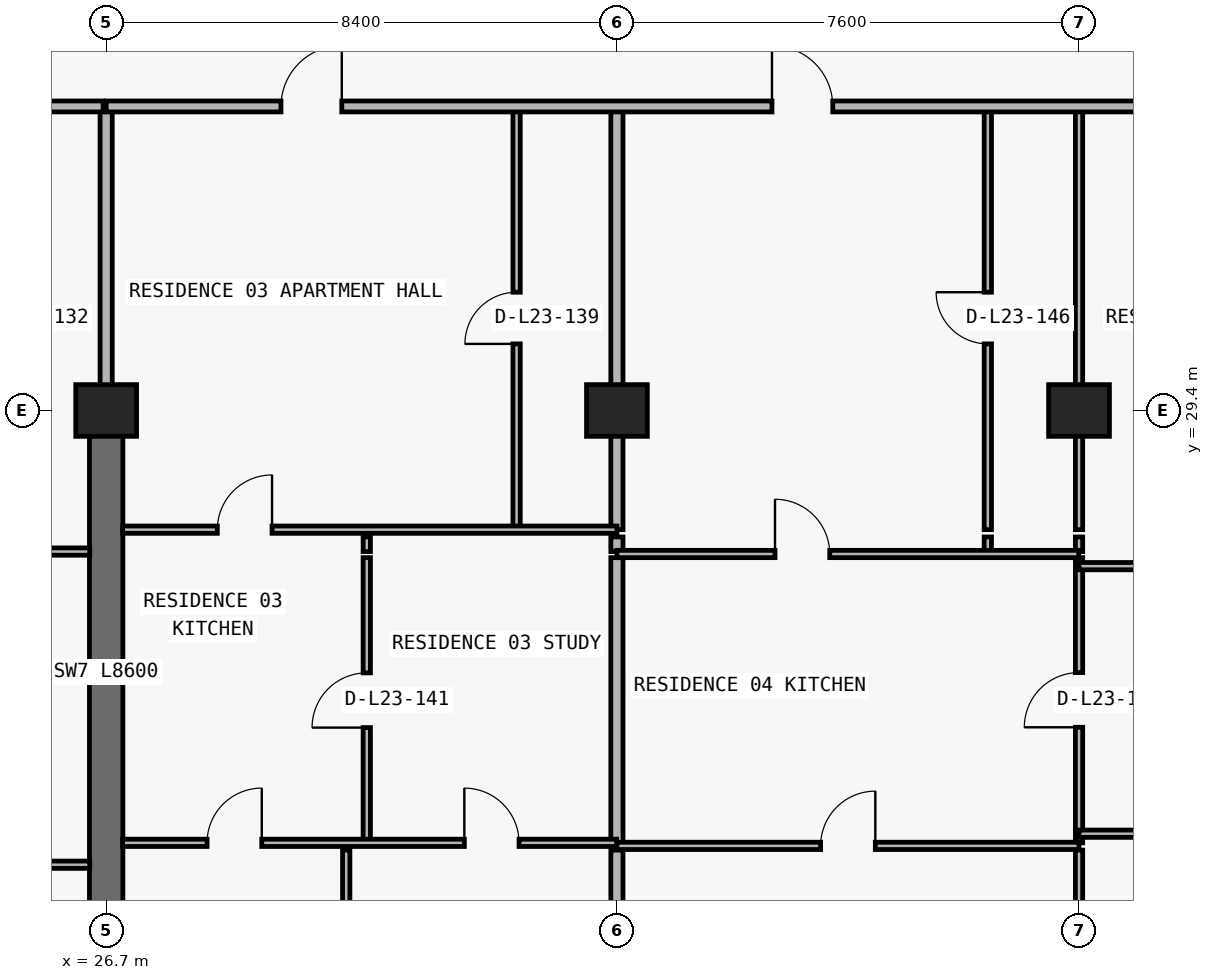
"""IFC4 building model, lengths in metres.
Left out: names, types, materials, properties, quantities, classifications, styles, units other than length and angle.
Written with IfcOpenShell. Run it as: python <this file> out.ifc"""

import sys

from ifc_helpers import new_model, si_unit, direction, frame, frame_2d, origin, origin_2d, place, context, subcontext, project, spatial, rectangle, extrude, element, fill, save


model = new_model("IFC4")
c1 = context("Model", 3, precision=1e-05, world=origin(), true_north=direction((0.0, 1.0)))
c2 = subcontext(c1, "Body", "Model", "MODEL_VIEW")
j1 = project(units=[si_unit("LENGTHUNIT", "METRE"), si_unit("PLANEANGLEUNIT", "RADIAN")], contexts=[c1])
p1 = place(None, origin())
s1 = spatial("IfcSite", under=j1, at=p1, CompositionType="ELEMENT")
p2 = place(p1, origin())
s2 = spatial("IfcBuilding", under=s1, at=p2, CompositionType="ELEMENT")
p3 = place(p2, frame((0.0, 0.0, 87.9)))
s3 = spatial("IfcBuildingStorey", under=s2, at=p3, CompositionType="ELEMENT", Elevation=87.9)
for number, where, z_axis, x_axis in (
    (1, (26.7, 29.4, 0.0), (0.0, 0.0, 1.0), (1.0, 0.0, 0.0)),
    (2, (35.1, 29.4, 0.0), (0.0, 0.0, 1.0), (1.0, 0.0, 0.0)),
    (3, (42.7, 29.4, 0.0), (0.0, 0.0, 1.0), (1.0, 0.0, 0.0)),
):
    element("IfcColumn", number, at=place(p3, frame(where, z_axis=z_axis, x_axis=x_axis)), inside=s3, PredefinedType="COLUMN", context=c2, shape_type="SweptSolid", body=[
        extrude(rectangle(XDim=1.0, YDim=0.85, at=origin_2d()), origin(), (0.0, 0.0, 1.0), 3.05),
    ])
p4 = place(p3, frame((26.7, 20.8, 0.0), z_axis=(0.0, 0.0, 1.0), x_axis=(0.0, 1.0, 0.0)))
e4 = element("IfcWall", 4, at=p4, inside=s3, PredefinedType="SHEAR", context=c2, shape_type="SweptSolid", body=[
    extrude(rectangle(XDim=8.6, YDim=0.55, at=frame_2d((4.3, 0.0))), origin(), (0.0, 0.0, 1.0), 3.05),
])
p5 = place(p3, frame((26.7, 29.405, 0.0), z_axis=(0.0, 0.0, 1.0), x_axis=(0.0, 1.0, 0.0)))
e5 = element("IfcWall", 5, at=p5, inside=s3, PredefinedType="PARTITIONING", context=c2, shape_type="SweptSolid", body=[
    extrude(rectangle(XDim=4.995, YDim=0.2, at=frame_2d((2.498, 0.0))), origin(), (0.0, 0.0, 1.0), 2.335),
])
p6 = place(p3, frame((30.648, 8.84, 0.0), z_axis=(0.0, 0.0, 1.0), x_axis=(0.0, 1.0, 0.0)))
e6 = element("IfcWall", 6, at=p6, inside=s3, PredefinedType="PARTITIONING", context=c2, shape_type="SweptSolid", body=[
    extrude(rectangle(XDim=13.33, YDim=0.12, at=frame_2d((6.665, 0.0))), origin(), (0.0, 0.0, 1.0), 3.05),
])
p7 = place(p3, frame((30.986, 22.29, 0.0), z_axis=(0.0, 0.0, 1.0), x_axis=(0.0, 1.0, 0.0)))
e7 = element("IfcWall", 7, at=p7, inside=s3, PredefinedType="PARTITIONING", context=c2, shape_type="SweptSolid", body=[
    extrude(rectangle(XDim=4.69, YDim=0.12, at=frame_2d((2.345, 0.0))), origin(), (0.0, 0.0, 1.0), 3.05),
])
p8 = place(p7, frame((1.895, 0.0, 0.0)))
e8 = element("IfcOpeningElement", 8, at=p8, cuts=e7, PredefinedType="OPENING", context=c2, shape_type="SweptSolid", body=[
    extrude(rectangle(XDim=0.9, YDim=2.15, at=frame_2d((0.45, 1.075))), frame((0.0, 0.07, 0.0), z_axis=(0.0, -1.0, 0.0), x_axis=(1.0, 0.0, 0.0)), (0.0, 0.0, 1.0), 0.14),
])
p9 = place(p3, frame((30.986, 27.08, 0.0), z_axis=(0.0, 0.0, 1.0), x_axis=(0.0, 1.0, 0.0)))
e9 = element("IfcWall", 9, at=p9, inside=s3, PredefinedType="PARTITIONING", context=c2, shape_type="SweptSolid", body=[
    extrude(rectangle(XDim=0.24, YDim=0.12, at=frame_2d((0.12, 0.0))), origin(), (0.0, 0.0, 1.0), 3.05),
])
p10 = place(p3, frame((33.45, 27.44, 0.0), z_axis=(0.0, 0.0, 1.0), x_axis=(0.0, 1.0, 0.0)))
e10 = element("IfcWall", 10, at=p10, inside=s3, PredefinedType="PARTITIONING", context=c2, shape_type="SweptSolid", body=[
    extrude(rectangle(XDim=6.96, YDim=0.12, at=frame_2d((3.48, 0.0))), origin(), (0.0, 0.0, 1.0), 3.05),
])
p11 = place(p10, frame((3.055, 0.0, 0.0)))
e11 = element("IfcOpeningElement", 11, at=p11, cuts=e10, PredefinedType="OPENING", context=c2, shape_type="SweptSolid", body=[
    extrude(rectangle(XDim=0.85, YDim=2.1, at=frame_2d((0.425, 1.05))), frame((0.0, 0.07, 0.0), z_axis=(0.0, -1.0, 0.0), x_axis=(1.0, 0.0, 0.0)), (0.0, 0.0, 1.0), 0.14),
])
p12 = place(p3, frame((35.1, 8.84, 0.0), z_axis=(0.0, 0.0, 1.0), x_axis=(0.0, 1.0, 0.0)))
e12 = element("IfcWall", 12, at=p12, inside=s3, PredefinedType="PARTITIONING", context=c2, shape_type="SweptSolid", body=[
    extrude(rectangle(XDim=13.33, YDim=0.2, at=frame_2d((6.665, 0.0))), origin(), (0.0, 0.0, 1.0), 2.174),
])
p13 = place(p3, frame((35.1, 22.29, 0.0), z_axis=(0.0, 0.0, 1.0), x_axis=(0.0, 1.0, 0.0)))
e13 = element("IfcWall", 13, at=p13, inside=s3, PredefinedType="PARTITIONING", context=c2, shape_type="SweptSolid", body=[
    extrude(rectangle(XDim=4.69, YDim=0.2, at=frame_2d((2.345, 0.0))), origin(), (0.0, 0.0, 1.0), 2.174),
])
p14 = place(p3, frame((35.1, 27.08, 0.0), z_axis=(0.0, 0.0, 1.0), x_axis=(0.0, 1.0, 0.0)))
e14 = element("IfcWall", 14, at=p14, inside=s3, PredefinedType="PARTITIONING", context=c2, shape_type="SweptSolid", body=[
    extrude(rectangle(XDim=0.24, YDim=0.2, at=frame_2d((0.12, 0.0))), origin(), (0.0, 0.0, 1.0), 2.174),
])
p15 = place(p3, frame((35.1, 27.44, 0.0), z_axis=(0.0, 0.0, 1.0), x_axis=(0.0, 1.0, 0.0)))
e15 = element("IfcWall", 15, at=p15, inside=s3, PredefinedType="PARTITIONING", context=c2, shape_type="SweptSolid", body=[
    extrude(rectangle(XDim=6.96, YDim=0.2, at=frame_2d((3.48, 0.0))), origin(), (0.0, 0.0, 1.0), 2.174),
])
p16 = place(p3, frame((41.2, 27.08, 0.0), z_axis=(0.0, 0.0, 1.0), x_axis=(0.0, 1.0, 0.0)))
e16 = element("IfcWall", 16, at=p16, inside=s3, PredefinedType="PARTITIONING", context=c2, shape_type="SweptSolid", body=[
    extrude(rectangle(XDim=0.24, YDim=0.12, at=frame_2d((0.12, 0.0))), origin(), (0.0, 0.0, 1.0), 3.05),
])
p17 = place(p3, frame((41.2, 27.44, 0.0), z_axis=(0.0, 0.0, 1.0), x_axis=(0.0, 1.0, 0.0)))
e17 = element("IfcWall", 17, at=p17, inside=s3, PredefinedType="PARTITIONING", context=c2, shape_type="SweptSolid", body=[
    extrude(rectangle(XDim=6.96, YDim=0.12, at=frame_2d((3.48, 0.0))), origin(), (0.0, 0.0, 1.0), 3.05),
])
p18 = place(p17, frame((3.055, 0.0, 0.0)))
e18 = element("IfcOpeningElement", 18, at=p18, cuts=e17, PredefinedType="OPENING", context=c2, shape_type="SweptSolid", body=[
    extrude(rectangle(XDim=0.85, YDim=2.1, at=frame_2d((0.425, 1.05))), frame((0.0, 0.07, 0.0), z_axis=(0.0, -1.0, 0.0), x_axis=(1.0, 0.0, 0.0)), (0.0, 0.0, 1.0), 0.14),
])
p19 = place(p3, frame((42.7, 8.84, 0.0), z_axis=(0.0, 0.0, 1.0), x_axis=(0.0, 1.0, 0.0)))
e19 = element("IfcWall", 19, at=p19, inside=s3, PredefinedType="PARTITIONING", context=c2, shape_type="SweptSolid", body=[
    extrude(rectangle(XDim=13.33, YDim=0.12, at=frame_2d((6.665, 0.0))), origin(), (0.0, 0.0, 1.0), 2.174),
])
p20 = place(p3, frame((42.7, 22.29, 0.0), z_axis=(0.0, 0.0, 1.0), x_axis=(0.0, 1.0, 0.0)))
e20 = element("IfcWall", 20, at=p20, inside=s3, PredefinedType="PARTITIONING", context=c2, shape_type="SweptSolid", body=[
    extrude(rectangle(XDim=4.69, YDim=0.12, at=frame_2d((2.345, 0.0))), origin(), (0.0, 0.0, 1.0), 2.174),
])
p21 = place(p20, frame((1.9, 0.0, 0.0)))
e21 = element("IfcOpeningElement", 21, at=p21, cuts=e20, PredefinedType="OPENING", context=c2, shape_type="SweptSolid", body=[
    extrude(rectangle(XDim=0.9, YDim=2.124, at=frame_2d((0.45, 1.062))), frame((0.0, 0.07, 0.0), z_axis=(0.0, -1.0, 0.0), x_axis=(1.0, 0.0, 0.0)), (0.0, 0.0, 1.0), 0.14),
])
p22 = place(p3, frame((42.7, 27.08, 0.0), z_axis=(0.0, 0.0, 1.0), x_axis=(0.0, 1.0, 0.0)))
e22 = element("IfcWall", 22, at=p22, inside=s3, PredefinedType="PARTITIONING", context=c2, shape_type="SweptSolid", body=[
    extrude(rectangle(XDim=0.24, YDim=0.12, at=frame_2d((0.12, 0.0))), origin(), (0.0, 0.0, 1.0), 2.174),
])
p23 = place(p3, frame((42.7, 27.44, 0.0), z_axis=(0.0, 0.0, 1.0), x_axis=(0.0, 1.0, 0.0)))
e23 = element("IfcWall", 23, at=p23, inside=s3, PredefinedType="PARTITIONING", context=c2, shape_type="SweptSolid", body=[
    extrude(rectangle(XDim=6.96, YDim=0.12, at=frame_2d((3.48, 0.0))), origin(), (0.0, 0.0, 1.0), 2.174),
])
p24 = place(p3, frame((18.3, 21.93, 0.0), z_axis=(0.0, 0.0, 1.0), x_axis=(1.0, 0.0, 0.0)))
e24 = element("IfcWall", 24, at=p24, inside=s3, PredefinedType="PARTITIONING", context=c2, shape_type="SweptSolid", body=[
    extrude(rectangle(XDim=8.13, YDim=0.12, at=frame_2d((4.065, 0.0))), origin(), (0.0, 0.0, 1.0), 3.05),
])
p25 = place(p24, frame((1.86, 0.0, 0.0)))
e25 = element("IfcOpeningElement", 25, at=p25, cuts=e24, PredefinedType="OPENING", context=c2, shape_type="SweptSolid", body=[
    extrude(rectangle(XDim=0.9, YDim=2.15, at=frame_2d((0.45, 1.075))), frame((0.0, 0.07, 0.0), z_axis=(0.0, -1.0, 0.0), x_axis=(1.0, 0.0, 0.0)), (0.0, 0.0, 1.0), 0.14),
])
p26 = place(p24, frame((6.008, 0.0, 0.0)))
e26 = element("IfcOpeningElement", 26, at=p26, cuts=e24, PredefinedType="OPENING", context=c2, shape_type="SweptSolid", body=[
    extrude(rectangle(XDim=0.9, YDim=2.15, at=frame_2d((0.45, 1.075))), frame((0.0, 0.07, 0.0), z_axis=(0.0, -1.0, 0.0), x_axis=(1.0, 0.0, 0.0)), (0.0, 0.0, 1.0), 0.14),
])
p27 = place(p3, frame((35.1, 22.24, 0.0), z_axis=(0.0, 0.0, 1.0), x_axis=(1.0, 0.0, 0.0)))
e27 = element("IfcWall", 27, at=p27, inside=s3, PredefinedType="PARTITIONING", context=c2, shape_type="SweptSolid", body=[
    extrude(rectangle(XDim=7.6, YDim=0.12, at=frame_2d((3.8, 0.0))), origin(), (0.0, 0.0, 1.0), 3.05),
])
p28 = place(p27, frame((3.35, 0.0, 0.0)))
e28 = element("IfcOpeningElement", 28, at=p28, cuts=e27, PredefinedType="OPENING", context=c2, shape_type="SweptSolid", body=[
    extrude(rectangle(XDim=0.9, YDim=2.15, at=frame_2d((0.45, 1.075))), frame((0.0, 0.07, 0.0), z_axis=(0.0, -1.0, 0.0), x_axis=(1.0, 0.0, 0.0)), (0.0, 0.0, 1.0), 0.14),
])
p29 = place(p3, frame((26.97, 22.29, 0.0), z_axis=(0.0, 0.0, 1.0), x_axis=(1.0, 0.0, 0.0)))
e29 = element("IfcWall", 29, at=p29, inside=s3, PredefinedType="PARTITIONING", context=c2, shape_type="SweptSolid", body=[
    extrude(rectangle(XDim=8.125, YDim=0.12, at=frame_2d((4.062, 0.0))), origin(), (0.0, 0.0, 1.0), 3.05),
])
p30 = place(p29, frame((1.389, 0.0, 0.0)))
e30 = element("IfcOpeningElement", 30, at=p30, cuts=e29, PredefinedType="OPENING", context=c2, shape_type="SweptSolid", body=[
    extrude(rectangle(XDim=0.9, YDim=2.15, at=frame_2d((0.45, 1.075))), frame((0.0, 0.07, 0.0), z_axis=(0.0, -1.0, 0.0), x_axis=(1.0, 0.0, 0.0)), (0.0, 0.0, 1.0), 0.14),
])
p31 = place(p29, frame((5.621, 0.0, 0.0)))
e31 = element("IfcOpeningElement", 31, at=p31, cuts=e29, PredefinedType="OPENING", context=c2, shape_type="SweptSolid", body=[
    extrude(rectangle(XDim=0.9, YDim=2.15, at=frame_2d((0.45, 1.075))), frame((0.0, 0.07, 0.0), z_axis=(0.0, -1.0, 0.0), x_axis=(1.0, 0.0, 0.0)), (0.0, 0.0, 1.0), 0.14),
])
p32 = place(p3, frame((42.7, 22.44, 0.0), z_axis=(0.0, 0.0, 1.0), x_axis=(1.0, 0.0, 0.0)))
e32 = element("IfcWall", 32, at=p32, inside=s3, PredefinedType="PARTITIONING", context=c2, shape_type="SweptSolid", body=[
    extrude(rectangle(XDim=8.13, YDim=0.12, at=frame_2d((4.065, 0.0))), origin(), (0.0, 0.0, 1.0), 3.05),
])
p33 = place(p32, frame((3.615, 0.0, 0.0)))
e33 = element("IfcOpeningElement", 33, at=p33, cuts=e32, PredefinedType="OPENING", context=c2, shape_type="SweptSolid", body=[
    extrude(rectangle(XDim=0.9, YDim=2.15, at=frame_2d((0.45, 1.075))), frame((0.0, 0.07, 0.0), z_axis=(0.0, -1.0, 0.0), x_axis=(1.0, 0.0, 0.0)), (0.0, 0.0, 1.0), 0.14),
])
p34 = place(p3, frame((42.7, 26.84, 0.0), z_axis=(0.0, 0.0, 1.0), x_axis=(1.0, 0.0, 0.0)))
e34 = element("IfcWall", 34, at=p34, inside=s3, PredefinedType="PARTITIONING", context=c2, shape_type="SweptSolid", body=[
    extrude(rectangle(XDim=8.13, YDim=0.12, at=frame_2d((4.065, 0.0))), origin(), (0.0, 0.0, 1.0), 3.05),
])
p35 = place(p34, frame((3.0, 0.0, 0.0)))
e35 = element("IfcOpeningElement", 35, at=p35, cuts=e34, PredefinedType="OPENING", context=c2, shape_type="SweptSolid", body=[
    extrude(rectangle(XDim=0.9, YDim=2.15, at=frame_2d((0.45, 1.075))), frame((0.0, 0.07, 0.0), z_axis=(0.0, -1.0, 0.0), x_axis=(1.0, 0.0, 0.0)), (0.0, 0.0, 1.0), 0.14),
])
p36 = place(p3, frame((35.1, 27.04, 0.0), z_axis=(0.0, 0.0, 1.0), x_axis=(1.0, 0.0, 0.0)))
e36 = element("IfcWall", 36, at=p36, inside=s3, PredefinedType="PARTITIONING", context=c2, shape_type="SweptSolid", body=[
    extrude(rectangle(XDim=7.595, YDim=0.12, at=frame_2d((3.797, 0.0))), origin(), (0.0, 0.0, 1.0), 3.05),
])
p37 = place(p36, frame((2.6, 0.0, 0.0)))
e37 = element("IfcOpeningElement", 37, at=p37, cuts=e36, PredefinedType="OPENING", context=c2, shape_type="SweptSolid", body=[
    extrude(rectangle(XDim=0.9, YDim=2.15, at=frame_2d((0.45, 1.075))), frame((0.0, 0.07, 0.0), z_axis=(0.0, -1.0, 0.0), x_axis=(1.0, 0.0, 0.0)), (0.0, 0.0, 1.0), 0.14),
])
p38 = place(p3, frame((18.3, 27.08, 0.0), z_axis=(0.0, 0.0, 1.0), x_axis=(1.0, 0.0, 0.0)))
e38 = element("IfcWall", 38, at=p38, inside=s3, PredefinedType="PARTITIONING", context=c2, shape_type="SweptSolid", body=[
    extrude(rectangle(XDim=8.13, YDim=0.12, at=frame_2d((4.065, 0.0))), origin(), (0.0, 0.0, 1.0), 3.05),
])
p39 = place(p38, frame((1.943, 0.0, 0.0)))
e39 = element("IfcOpeningElement", 39, at=p39, cuts=e38, PredefinedType="OPENING", context=c2, shape_type="SweptSolid", body=[
    extrude(rectangle(XDim=0.9, YDim=2.15, at=frame_2d((0.45, 1.075))), frame((0.0, 0.07, 0.0), z_axis=(0.0, -1.0, 0.0), x_axis=(1.0, 0.0, 0.0)), (0.0, 0.0, 1.0), 0.14),
])
p40 = place(p3, frame((26.97, 27.44, 0.0), z_axis=(0.0, 0.0, 1.0), x_axis=(1.0, 0.0, 0.0)))
e40 = element("IfcWall", 40, at=p40, inside=s3, PredefinedType="PARTITIONING", context=c2, shape_type="SweptSolid", body=[
    extrude(rectangle(XDim=8.13, YDim=0.12, at=frame_2d((4.065, 0.0))), origin(), (0.0, 0.0, 1.0), 3.05),
])
p41 = place(p40, frame((1.558, 0.0, 0.0)))
e41 = element("IfcOpeningElement", 41, at=p41, cuts=e40, PredefinedType="OPENING", context=c2, shape_type="SweptSolid", body=[
    extrude(rectangle(XDim=0.9, YDim=2.15, at=frame_2d((0.45, 1.075))), frame((0.0, 0.07, 0.0), z_axis=(0.0, -1.0, 0.0), x_axis=(1.0, 0.0, 0.0)), (0.0, 0.0, 1.0), 0.14),
])
p42 = place(p3, frame((18.3, 34.4, 0.0), z_axis=(0.0, 0.0, 1.0), x_axis=(1.0, 0.0, 0.0)))
e42 = element("IfcWall", 42, at=p42, inside=s3, PredefinedType="PARTITIONING", context=c2, shape_type="SweptSolid", body=[
    extrude(rectangle(XDim=8.35, YDim=0.18, at=frame_2d((4.175, 0.0))), origin(), (0.0, 0.0, 1.0), 3.05),
])
p43 = place(p42, frame((2.875, 0.0, 0.0)))
e43 = element("IfcOpeningElement", 43, at=p43, cuts=e42, PredefinedType="OPENING", context=c2, shape_type="SweptSolid", body=[
    extrude(rectangle(XDim=1.0, YDim=2.2, at=frame_2d((0.5, 1.1))), frame((0.0, 0.1, 0.0), z_axis=(0.0, -1.0, 0.0), x_axis=(1.0, 0.0, 0.0)), (0.0, 0.0, 1.0), 0.2),
])
p44 = place(p3, frame((26.7, 34.4, 0.0), z_axis=(0.0, 0.0, 1.0), x_axis=(1.0, 0.0, 0.0)))
e44 = element("IfcWall", 44, at=p44, inside=s3, PredefinedType="PARTITIONING", context=c2, shape_type="SweptSolid", body=[
    extrude(rectangle(XDim=29.186, YDim=0.18, at=frame_2d((14.593, 0.0))), origin(), (0.0, 0.0, 1.0), 3.05),
])
p45 = place(p44, frame((2.875, 0.0, 0.0)))
e45 = element("IfcOpeningElement", 45, at=p45, cuts=e44, PredefinedType="OPENING", context=c2, shape_type="SweptSolid", body=[
    extrude(rectangle(XDim=1.0, YDim=2.2, at=frame_2d((0.5, 1.1))), frame((0.0, 0.1, 0.0), z_axis=(0.0, -1.0, 0.0), x_axis=(1.0, 0.0, 0.0)), (0.0, 0.0, 1.0), 0.2),
])
p46 = place(p44, frame((10.95, 0.0, 0.0)))
e46 = element("IfcOpeningElement", 46, at=p46, cuts=e44, PredefinedType="OPENING", context=c2, shape_type="SweptSolid", body=[
    extrude(rectangle(XDim=1.0, YDim=2.2, at=frame_2d((0.5, 1.1))), frame((0.0, 0.1, 0.0), z_axis=(0.0, -1.0, 0.0), x_axis=(1.0, 0.0, 0.0)), (0.0, 0.0, 1.0), 0.2),
])
p47 = place(p44, frame((26.293, 0.0, 0.0)))
e47 = element("IfcOpeningElement", 47, at=p47, cuts=e44, PredefinedType="OPENING", context=c2, shape_type="SweptSolid", body=[
    extrude(rectangle(XDim=1.0, YDim=2.2, at=frame_2d((0.5, 1.1))), frame((0.0, 0.1, 0.0), z_axis=(0.0, -1.0, 0.0), x_axis=(1.0, 0.0, 0.0)), (0.0, 0.0, 1.0), 0.2),
])
p48 = place(p45, origin())
e48 = element("IfcDoor", 48, at=p48, inside=s3, OperationType="SINGLE_SWING_RIGHT", PredefinedType="DOOR", context=c2, shape_type="SweptSolid", body=[
    extrude(rectangle(XDim=1.0, YDim=2.2, at=frame_2d((0.5, 1.1))), frame((0.0, 0.025, 0.0), z_axis=(0.0, -1.0, 0.0), x_axis=(1.0, 0.0, 0.0)), (0.0, 0.0, 1.0), 0.05),
])
fill(e45, e48)
p49 = place(p11, origin())
e49 = element("IfcDoor", 49, at=p49, inside=s3, OperationType="SINGLE_SWING_LEFT", PredefinedType="DOOR", context=c2, shape_type="SweptSolid", body=[
    extrude(rectangle(XDim=0.85, YDim=2.1, at=frame_2d((0.425, 1.05))), frame((0.0, 0.025, 0.0), z_axis=(0.0, -1.0, 0.0), x_axis=(1.0, 0.0, 0.0)), (0.0, 0.0, 1.0), 0.05),
])
fill(e11, e49)
p50 = place(p41, origin())
e50 = element("IfcDoor", 50, at=p50, inside=s3, OperationType="SINGLE_SWING_RIGHT", PredefinedType="DOOR", context=c2, shape_type="SweptSolid", body=[
    extrude(rectangle(XDim=0.9, YDim=2.15, at=frame_2d((0.45, 1.075))), frame((0.0, 0.025, 0.0), z_axis=(0.0, -1.0, 0.0), x_axis=(1.0, 0.0, 0.0)), (0.0, 0.0, 1.0), 0.05),
])
fill(e41, e50)
p51 = place(p8, origin())
e51 = element("IfcDoor", 51, at=p51, inside=s3, OperationType="SINGLE_SWING_LEFT", PredefinedType="DOOR", context=c2, shape_type="SweptSolid", body=[
    extrude(rectangle(XDim=0.9, YDim=2.15, at=frame_2d((0.45, 1.075))), frame((0.0, 0.025, 0.0), z_axis=(0.0, -1.0, 0.0), x_axis=(1.0, 0.0, 0.0)), (0.0, 0.0, 1.0), 0.05),
])
fill(e8, e51)
p52 = place(p30, origin())
e52 = element("IfcDoor", 52, at=p52, inside=s3, OperationType="SINGLE_SWING_RIGHT", PredefinedType="DOOR", context=c2, shape_type="SweptSolid", body=[
    extrude(rectangle(XDim=0.9, YDim=2.15, at=frame_2d((0.45, 1.075))), frame((0.0, 0.025, 0.0), z_axis=(0.0, -1.0, 0.0), x_axis=(1.0, 0.0, 0.0)), (0.0, 0.0, 1.0), 0.05),
])
fill(e30, e52)
p53 = place(p31, origin())
e53 = element("IfcDoor", 53, at=p53, inside=s3, OperationType="SINGLE_SWING_LEFT", PredefinedType="DOOR", context=c2, shape_type="SweptSolid", body=[
    extrude(rectangle(XDim=0.9, YDim=2.15, at=frame_2d((0.45, 1.075))), frame((0.0, 0.025, 0.0), z_axis=(0.0, -1.0, 0.0), x_axis=(1.0, 0.0, 0.0)), (0.0, 0.0, 1.0), 0.05),
])
fill(e31, e53)
p54 = place(p46, origin())
e54 = element("IfcDoor", 54, at=p54, inside=s3, OperationType="SINGLE_SWING_LEFT", PredefinedType="DOOR", context=c2, shape_type="SweptSolid", body=[
    extrude(rectangle(XDim=1.0, YDim=2.2, at=frame_2d((0.5, 1.1))), frame((0.0, 0.025, 0.0), z_axis=(0.0, -1.0, 0.0), x_axis=(1.0, 0.0, 0.0)), (0.0, 0.0, 1.0), 0.05),
])
fill(e46, e54)
p55 = place(p18, origin())
e55 = element("IfcDoor", 55, at=p55, inside=s3, OperationType="SINGLE_SWING_RIGHT", PredefinedType="DOOR", context=c2, shape_type="SweptSolid", body=[
    extrude(rectangle(XDim=0.85, YDim=2.1, at=frame_2d((0.425, 1.05))), frame((0.0, 0.025, 0.0), z_axis=(0.0, -1.0, 0.0), x_axis=(1.0, 0.0, 0.0)), (0.0, 0.0, 1.0), 0.05),
])
fill(e18, e55)
p56 = place(p37, origin())
e56 = element("IfcDoor", 56, at=p56, inside=s3, OperationType="SINGLE_SWING_LEFT", PredefinedType="DOOR", context=c2, shape_type="SweptSolid", body=[
    extrude(rectangle(XDim=0.9, YDim=2.15, at=frame_2d((0.45, 1.075))), frame((0.0, 0.025, 0.0), z_axis=(0.0, -1.0, 0.0), x_axis=(1.0, 0.0, 0.0)), (0.0, 0.0, 1.0), 0.05),
])
fill(e37, e56)
p57 = place(p28, origin())
e57 = element("IfcDoor", 57, at=p57, inside=s3, OperationType="SINGLE_SWING_RIGHT", PredefinedType="DOOR", context=c2, shape_type="SweptSolid", body=[
    extrude(rectangle(XDim=0.9, YDim=2.15, at=frame_2d((0.45, 1.075))), frame((0.0, 0.025, 0.0), z_axis=(0.0, -1.0, 0.0), x_axis=(1.0, 0.0, 0.0)), (0.0, 0.0, 1.0), 0.05),
])
fill(e28, e57)
p58 = place(p21, origin())
e58 = element("IfcDoor", 58, at=p58, inside=s3, OperationType="SINGLE_SWING_LEFT", PredefinedType="DOOR", context=c2, shape_type="SweptSolid", body=[
    extrude(rectangle(XDim=0.9, YDim=2.124, at=frame_2d((0.45, 1.062))), frame((0.0, 0.025, 0.0), z_axis=(0.0, -1.0, 0.0), x_axis=(1.0, 0.0, 0.0)), (0.0, 0.0, 1.0), 0.05),
])
fill(e21, e58)
save(model, sys.argv[1])
